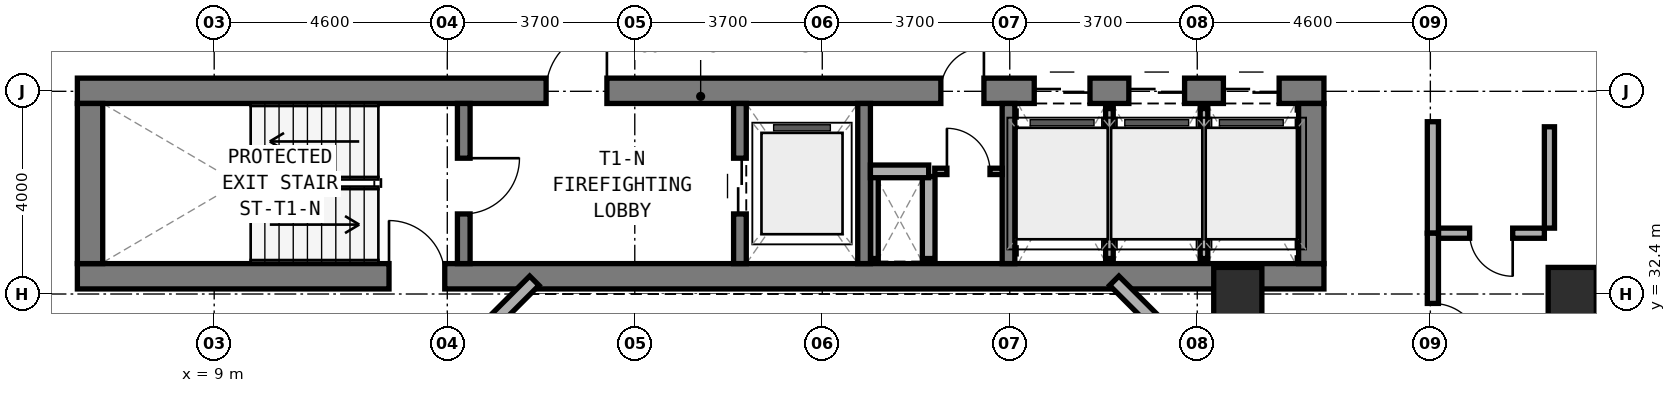
"""IFC4 building model, lengths in metres.
Left out: names, types, materials, properties, quantities, classifications, styles, units other than length and angle.
Written with IfcOpenShell. Run it as: python <this file> out.ifc"""

import sys

from ifc_helpers import new_model, si_unit, direction, frame, frame_2d, origin, origin_2d, place, context, subcontext, project, spatial, rectangle, extrude, element, fill, save


model = new_model("IFC4")
c1 = context("Model", 3, precision=1e-05, world=origin(), true_north=direction((0.0, 1.0)))
c2 = subcontext(c1, "Body", "Model", "MODEL_VIEW")
j1 = project(units=[si_unit("LENGTHUNIT", "METRE"), si_unit("PLANEANGLEUNIT", "RADIAN")], contexts=[c1])
p1 = place(None, origin())
s1 = spatial("IfcSite", under=j1, at=p1, CompositionType="ELEMENT")
p2 = place(p1, origin())
s2 = spatial("IfcBuilding", under=s1, at=p2, CompositionType="ELEMENT")
p3 = place(p2, frame((0.0, 0.0, 59.0)))
s3 = spatial("IfcBuildingStorey", under=s2, at=p3, CompositionType="ELEMENT", Elevation=59.0)
p4 = place(p3, frame((6.3, 32.75, 0.0), z_axis=(0.0, 0.0, 1.0), x_axis=(1.0, 0.0, 0.0)))
e1 = element("IfcWall", 1, at=p4, inside=s3, PredefinedType="SHEAR", context=c2, shape_type="SweptSolid", body=[
    extrude(rectangle(XDim=24.6, YDim=0.5, at=frame_2d((12.3, 0.0))), origin(), (0.0, 0.0, 1.0), 3.5),
])
p5 = place(p4, frame((6.15, 0.0, 0.0)))
e2 = element("IfcOpeningElement", 2, at=p5, cuts=e1, PredefinedType="OPENING", context=c2, shape_type="SweptSolid", body=[
    extrude(rectangle(XDim=1.1, YDim=2.15, at=frame_2d((0.55, 1.075))), frame((0.0, 0.26, 0.0), z_axis=(0.0, -1.0, 0.0), x_axis=(1.0, 0.0, 0.0)), (0.0, 0.0, 1.0), 0.52),
])
p6 = place(p3, frame((6.3, 36.41, 0.0), z_axis=(0.0, 0.0, 1.0), x_axis=(1.0, 0.0, 0.0)))
e3 = element("IfcWall", 3, at=p6, inside=s3, PredefinedType="SHEAR", context=c2, shape_type="SweptSolid", body=[
    extrude(rectangle(XDim=24.6, YDim=0.5, at=frame_2d((12.3, 0.0))), origin(), (0.0, 0.0, 1.0), 3.5),
])
p7 = place(p6, frame((9.25, 0.0, 0.0)))
e4 = element("IfcOpeningElement", 4, at=p7, cuts=e3, PredefinedType="OPENING", context=c2, shape_type="SweptSolid", body=[
    extrude(rectangle(XDim=1.2, YDim=2.15, at=frame_2d((0.6, 1.075))), frame((0.0, 0.26, 0.0), z_axis=(0.0, -1.0, 0.0), x_axis=(1.0, 0.0, 0.0)), (0.0, 0.0, 1.0), 0.52),
])
p8 = place(p6, frame((17.04, 0.0, 0.0)))
e5 = element("IfcOpeningElement", 5, at=p8, cuts=e3, PredefinedType="OPENING", context=c2, shape_type="SweptSolid", body=[
    extrude(rectangle(XDim=0.85, YDim=2.1, at=frame_2d((0.425, 1.05))), frame((0.0, 0.26, 0.0), z_axis=(0.0, -1.0, 0.0), x_axis=(1.0, 0.0, 0.0)), (0.0, 0.0, 1.0), 0.52),
])
p9 = place(p6, frame((18.883, 0.0, 0.0)))
e6 = element("IfcOpeningElement", 6, at=p9, cuts=e3, PredefinedType="OPENING", context=c2, shape_type="SweptSolid", body=[
    extrude(rectangle(XDim=1.1, YDim=2.15, at=frame_2d((0.55, 1.075))), frame((0.0, 0.26, 0.0), z_axis=(0.0, -1.0, 0.0), x_axis=(1.0, 0.0, 0.0)), (0.0, 0.0, 1.0), 0.52),
])
p10 = place(p6, frame((20.75, 0.0, 0.0)))
e7 = element("IfcOpeningElement", 7, at=p10, cuts=e3, PredefinedType="OPENING", context=c2, shape_type="SweptSolid", body=[
    extrude(rectangle(XDim=1.1, YDim=2.15, at=frame_2d((0.55, 1.075))), frame((0.0, 0.26, 0.0), z_axis=(0.0, -1.0, 0.0), x_axis=(1.0, 0.0, 0.0)), (0.0, 0.0, 1.0), 0.52),
])
p11 = place(p6, frame((22.616, 0.0, 0.0)))
e8 = element("IfcOpeningElement", 8, at=p11, cuts=e3, PredefinedType="OPENING", context=c2, shape_type="SweptSolid", body=[
    extrude(rectangle(XDim=1.1, YDim=2.15, at=frame_2d((0.55, 1.075))), frame((0.0, 0.26, 0.0), z_axis=(0.0, -1.0, 0.0), x_axis=(1.0, 0.0, 0.0)), (0.0, 0.0, 1.0), 0.52),
])
for number, where, z_axis, x_axis in (
    (9, (6.55, 33.0, 0.0), (0.0, 0.0, 1.0), (0.0, 1.0, 0.0)),
    (10, (30.65, 33.0, 0.0), (0.0, 0.0, 1.0), (0.0, 1.0, 0.0)),
):
    element("IfcWall", number, at=place(p3, frame(where, z_axis=z_axis, x_axis=x_axis)), inside=s3, PredefinedType="SHEAR", context=c2, shape_type="SweptSolid", body=[
        extrude(rectangle(XDim=3.16, YDim=0.5, at=frame_2d((1.58, 0.0))), origin(), (0.0, 0.0, 1.0), 3.5),
    ])
p12 = place(p3, frame((13.925, 33.0, 0.0), z_axis=(0.0, 0.0, 1.0), x_axis=(0.0, 1.0, 0.0)))
e11 = element("IfcWall", 11, at=p12, inside=s3, PredefinedType="STANDARD", context=c2, shape_type="SweptSolid", body=[
    extrude(rectangle(XDim=3.16, YDim=0.25, at=frame_2d((1.58, 0.0))), origin(), (0.0, 0.0, 1.0), 3.22),
])
p13 = place(p12, frame((0.98, 0.0, 0.0)))
e12 = element("IfcOpeningElement", 12, at=p13, cuts=e11, PredefinedType="OPENING", context=c2, shape_type="SweptSolid", body=[
    extrude(rectangle(XDim=1.1, YDim=2.15, at=frame_2d((0.55, 1.075))), frame((0.0, 0.135, 0.0), z_axis=(0.0, -1.0, 0.0), x_axis=(1.0, 0.0, 0.0)), (0.0, 0.0, 1.0), 0.27),
])
p14 = place(p3, frame((19.375, 33.0, 0.0), z_axis=(0.0, 0.0, 1.0), x_axis=(0.0, 1.0, 0.0)))
e13 = element("IfcWall", 13, at=p14, inside=s3, PredefinedType="STANDARD", context=c2, shape_type="SweptSolid", body=[
    extrude(rectangle(XDim=3.16, YDim=0.25, at=frame_2d((1.58, 0.0))), origin(), (0.0, 0.0, 1.0), 3.22),
])
p15 = place(p14, frame((0.98, 0.0, 0.0)))
e14 = element("IfcOpeningElement", 14, at=p15, cuts=e13, PredefinedType="OPENING", context=c2, shape_type="SweptSolid", body=[
    extrude(rectangle(XDim=1.1, YDim=2.15, at=frame_2d((0.55, 1.075))), frame((0.0, 0.135, 0.0), z_axis=(0.0, -1.0, 0.0), x_axis=(1.0, 0.0, 0.0)), (0.0, 0.0, 1.0), 0.27),
])
for number, where, z_axis, x_axis in (
    (15, (21.825, 33.0, 0.0), (0.0, 0.0, 1.0), (0.0, 1.0, 0.0)),
    (16, (24.675, 33.0, 0.0), (0.0, 0.0, 1.0), (0.0, 1.0, 0.0)),
):
    element("IfcWall", number, at=place(p3, frame(where, z_axis=z_axis, x_axis=x_axis)), inside=s3, PredefinedType="STANDARD", context=c2, shape_type="SweptSolid", body=[
        extrude(rectangle(XDim=3.16, YDim=0.25, at=frame_2d((1.58, 0.0))), origin(), (0.0, 0.0, 1.0), 3.22),
    ])
for number, where, z_axis, x_axis in (
    (17, (35.8, 32.35, 0.0), (0.0, 0.0, 1.0), (1.0, 0.0, 0.0)),
    (18, (29.2, 32.35, 0.0), (0.0, 0.0, 1.0), (1.0, 0.0, 0.0)),
):
    element("IfcColumn", number, at=place(p3, frame(where, z_axis=z_axis, x_axis=x_axis)), inside=s3, PredefinedType="COLUMN", context=c2, shape_type="SweptSolid", body=[
        extrude(rectangle(XDim=0.95, YDim=1.15, at=origin_2d()), origin(), (0.0, 0.0, 1.0), 3.5),
    ])
p16 = place(p3, frame((28.596, 30.828, 0.0), z_axis=(0.0, 0.0, 1.0), x_axis=(-0.707059717605, 0.707153841636, 0.0)))
e19 = element("IfcWall", 19, at=p16, inside=s3, PredefinedType="STANDARD", context=c2, shape_type="SweptSolid", body=[
    extrude(rectangle(XDim=2.594, YDim=0.26, at=frame_2d((1.297, 0.0))), origin(), (0.0, 0.0, 1.0), 3.22),
])
p17 = place(p3, frame((15.318, 32.662, 0.0), z_axis=(0.0, 0.0, 1.0), x_axis=(-0.707106781187, -0.707106781187, 0.0)))
e20 = element("IfcWall", 20, at=p17, inside=s3, PredefinedType="STANDARD", context=c2, shape_type="SweptSolid", body=[
    extrude(rectangle(XDim=2.594, YDim=0.26, at=frame_2d((1.297, 0.0))), origin(), (0.0, 0.0, 1.0), 3.22),
])
p18 = place(p3, frame((22.03, 33.1, 0.0), z_axis=(0.0, 0.0, 1.0), x_axis=(0.0, 1.0, 0.0)))
e21 = element("IfcWall", 21, at=p18, inside=s3, PredefinedType="PARTITIONING", context=c2, shape_type="SweptSolid", body=[
    extrude(rectangle(XDim=1.62, YDim=0.15, at=frame_2d((0.81, 0.0))), origin(), (0.0, 0.0, 1.0), 3.22),
])
p19 = place(p3, frame((23.1, 33.1, 0.0), z_axis=(0.0, 0.0, 1.0), x_axis=(0.0, 1.0, 0.0)))
e22 = element("IfcWall", 22, at=p19, inside=s3, PredefinedType="SOLIDWALL", context=c2, shape_type="SweptSolid", body=[
    extrude(rectangle(XDim=1.62, YDim=0.25, at=frame_2d((0.81, 0.0))), origin(), (0.0, 0.0, 1.0), 3.22),
])
p20 = place(p3, frame((21.95, 34.82, 0.0), z_axis=(0.0, 0.0, 1.0), x_axis=(1.0, 0.0, 0.0)))
e23 = element("IfcWall", 23, at=p20, inside=s3, PredefinedType="SOLIDWALL", context=c2, shape_type="SweptSolid", body=[
    extrude(rectangle(XDim=1.15, YDim=0.25, at=frame_2d((0.575, 0.0))), origin(), (0.0, 0.0, 1.0), 3.22),
])
p21 = place(p3, frame((23.22, 34.82, 0.0), z_axis=(0.0, 0.0, 1.0), x_axis=(1.0, 0.0, 0.0)))
e24 = element("IfcWall", 24, at=p21, inside=s3, PredefinedType="PARTITIONING", context=c2, shape_type="SweptSolid", body=[
    extrude(rectangle(XDim=1.33, YDim=0.125, at=frame_2d((0.665, 0.0))), origin(), (0.0, 0.0, 1.0), 3.22),
])
p22 = place(p21, frame((0.24, 0.0, 0.0)))
e25 = element("IfcOpeningElement", 25, at=p22, cuts=e24, PredefinedType="OPENING", context=c2, shape_type="SweptSolid", body=[
    extrude(rectangle(XDim=0.85, YDim=2.1, at=frame_2d((0.425, 1.05))), frame((0.0, 0.073, 0.0), z_axis=(0.0, -1.0, 0.0), x_axis=(1.0, 0.0, 0.0)), (0.0, 0.0, 1.0), 0.145),
])
p23 = place(p3, frame((26.667, 33.1, 0.0), z_axis=(0.0, 0.0, 1.0), x_axis=(0.0, 1.0, 0.0)))
e26 = element("IfcWall", 26, at=p23, inside=s3, PredefinedType="PARTITIONING", context=c2, shape_type="SweptSolid", body=[
    extrude(rectangle(XDim=2.96, YDim=0.15, at=frame_2d((1.48, 0.0))), origin(), (0.0, 0.0, 1.0), 3.22),
])
p24 = place(p3, frame((28.533, 33.1, 0.0), z_axis=(0.0, 0.0, 1.0), x_axis=(0.0, 1.0, 0.0)))
e27 = element("IfcWall", 27, at=p24, inside=s3, PredefinedType="PARTITIONING", context=c2, shape_type="SweptSolid", body=[
    extrude(rectangle(XDim=2.96, YDim=0.15, at=frame_2d((1.48, 0.0))), origin(), (0.0, 0.0, 1.0), 2.495),
])
p25 = place(p3, frame((33.15, 33.6, 0.0), z_axis=(0.0, 0.0, 1.0), x_axis=(1.0, 0.0, 0.0)))
e28 = element("IfcWall", 28, at=p25, inside=s3, PredefinedType="PLUMBINGWALL", context=c2, shape_type="SweptSolid", body=[
    extrude(rectangle(XDim=2.1, YDim=0.2, at=frame_2d((1.05, 0.0))), origin(), (0.0, 0.0, 1.0), 3.22),
])
p26 = place(p25, frame((0.625, 0.0, 0.0)))
e29 = element("IfcOpeningElement", 29, at=p26, cuts=e28, PredefinedType="OPENING", context=c2, shape_type="SweptSolid", body=[
    extrude(rectangle(XDim=0.85, YDim=2.1, at=frame_2d((0.425, 1.05))), frame((0.0, 0.11, 0.0), z_axis=(0.0, -1.0, 0.0), x_axis=(1.0, 0.0, 0.0)), (0.0, 0.0, 1.0), 0.22),
])
p27 = place(p3, frame((35.35, 33.7, 0.0), z_axis=(0.0, 0.0, 1.0), x_axis=(0.0, 1.0, 0.0)))
e30 = element("IfcWall", 30, at=p27, inside=s3, PredefinedType="PLUMBINGWALL", context=c2, shape_type="SweptSolid", body=[
    extrude(rectangle(XDim=2.0, YDim=0.2, at=frame_2d((1.0, 0.0))), origin(), (0.0, 0.0, 1.0), 2.745),
])
p28 = place(p3, frame((33.05, 33.6, 0.0), z_axis=(0.0, 0.0, 1.0), x_axis=(0.0, 1.0, 0.0)))
e31 = element("IfcWall", 31, at=p28, inside=s3, PredefinedType="SOLIDWALL", context=c2, shape_type="SweptSolid", body=[
    extrude(rectangle(XDim=2.2, YDim=0.22, at=frame_2d((1.1, 0.0))), origin(), (0.0, 0.0, 1.0), 3.22),
])
p29 = place(p3, frame((33.05, 29.878, 0.0), z_axis=(0.0, 0.0, 1.0), x_axis=(0.0, 1.0, 0.0)))
e32 = element("IfcWall", 32, at=p29, inside=s3, PredefinedType="SOLIDWALL", context=c2, shape_type="SweptSolid", body=[
    extrude(rectangle(XDim=3.722, YDim=0.22, at=frame_2d((1.861, 0.0))), origin(), (0.0, 0.0, 1.0), 2.495),
])
p30 = place(p29, frame((1.386, 0.0, 0.0)))
e33 = element("IfcOpeningElement", 33, at=p30, cuts=e32, PredefinedType="OPENING", context=c2, shape_type="SweptSolid", body=[
    extrude(rectangle(XDim=0.95, YDim=2.1, at=frame_2d((0.475, 1.05))), frame((0.0, 0.12, 0.0), z_axis=(0.0, -1.0, 0.0), x_axis=(1.0, 0.0, 0.0)), (0.0, 0.0, 1.0), 0.24),
])
p31 = place(p13, frame((1.1, 0.0, 0.0), z_axis=(0.0, 0.0, 1.0), x_axis=(-1.0, 0.0, 0.0)))
e34 = element("IfcDoor", 34, at=p31, inside=s3, OperationType="SINGLE_SWING_LEFT", PredefinedType="DOOR", context=c2, shape_type="SweptSolid", body=[
    extrude(rectangle(XDim=1.1, YDim=2.15, at=frame_2d((0.55, 1.075))), frame((0.0, 0.025, 0.0), z_axis=(0.0, -1.0, 0.0), x_axis=(1.0, 0.0, 0.0)), (0.0, 0.0, 1.0), 0.05),
])
fill(e12, e34)
p32 = place(p7, origin())
e35 = element("IfcDoor", 35, at=p32, inside=s3, OperationType="SINGLE_SWING_RIGHT", PredefinedType="DOOR", context=c2, shape_type="SweptSolid", body=[
    extrude(rectangle(XDim=1.2, YDim=2.15, at=frame_2d((0.6, 1.075))), frame((0.0, 0.025, 0.0), z_axis=(0.0, -1.0, 0.0), x_axis=(1.0, 0.0, 0.0)), (0.0, 0.0, 1.0), 0.05),
])
fill(e4, e35)
p33 = place(p15, origin())
e36 = element("IfcDoor", 36, at=p33, inside=s3, OperationType="DOUBLE_DOOR_SLIDING", PredefinedType="DOOR", context=c2, shape_type="SweptSolid", body=[
    extrude(rectangle(XDim=1.1, YDim=2.15, at=frame_2d((0.55, 1.075))), frame((0.0, 0.025, 0.0), z_axis=(0.0, -1.0, 0.0), x_axis=(1.0, 0.0, 0.0)), (0.0, 0.0, 1.0), 0.05),
])
fill(e14, e36)
p34 = place(p8, origin())
e37 = element("IfcDoor", 37, at=p34, inside=s3, OperationType="SINGLE_SWING_RIGHT", PredefinedType="DOOR", context=c2, shape_type="SweptSolid", body=[
    extrude(rectangle(XDim=0.85, YDim=2.1, at=frame_2d((0.425, 1.05))), frame((0.0, 0.025, 0.0), z_axis=(0.0, -1.0, 0.0), x_axis=(1.0, 0.0, 0.0)), (0.0, 0.0, 1.0), 0.05),
])
fill(e5, e37)
p35 = place(p9, origin())
e38 = element("IfcDoor", 38, at=p35, inside=s3, OperationType="DOUBLE_DOOR_SLIDING", PredefinedType="DOOR", context=c2, shape_type="SweptSolid", body=[
    extrude(rectangle(XDim=1.1, YDim=2.15, at=frame_2d((0.55, 1.075))), frame((0.0, 0.025, 0.0), z_axis=(0.0, -1.0, 0.0), x_axis=(1.0, 0.0, 0.0)), (0.0, 0.0, 1.0), 0.05),
])
fill(e6, e38)
p36 = place(p10, origin())
e39 = element("IfcDoor", 39, at=p36, inside=s3, OperationType="DOUBLE_DOOR_SLIDING", PredefinedType="DOOR", context=c2, shape_type="SweptSolid", body=[
    extrude(rectangle(XDim=1.1, YDim=2.15, at=frame_2d((0.55, 1.075))), frame((0.0, 0.025, 0.0), z_axis=(0.0, -1.0, 0.0), x_axis=(1.0, 0.0, 0.0)), (0.0, 0.0, 1.0), 0.05),
])
fill(e7, e39)
p37 = place(p11, origin())
e40 = element("IfcDoor", 40, at=p37, inside=s3, OperationType="DOUBLE_DOOR_SLIDING", PredefinedType="DOOR", context=c2, shape_type="SweptSolid", body=[
    extrude(rectangle(XDim=1.1, YDim=2.15, at=frame_2d((0.55, 1.075))), frame((0.0, 0.025, 0.0), z_axis=(0.0, -1.0, 0.0), x_axis=(1.0, 0.0, 0.0)), (0.0, 0.0, 1.0), 0.05),
])
fill(e8, e40)
p38 = place(p5, origin())
e41 = element("IfcDoor", 41, at=p38, inside=s3, OperationType="SINGLE_SWING_LEFT", PredefinedType="DOOR", context=c2, shape_type="SweptSolid", body=[
    extrude(rectangle(XDim=1.1, YDim=2.15, at=frame_2d((0.55, 1.075))), frame((0.0, 0.025, 0.0), z_axis=(0.0, -1.0, 0.0), x_axis=(1.0, 0.0, 0.0)), (0.0, 0.0, 1.0), 0.05),
])
fill(e2, e41)
p39 = place(p22, origin())
e42 = element("IfcDoor", 42, at=p39, inside=s3, OperationType="SINGLE_SWING_LEFT", PredefinedType="DOOR", context=c2, shape_type="SweptSolid", body=[
    extrude(rectangle(XDim=0.85, YDim=2.1, at=frame_2d((0.425, 1.05))), frame((0.0, 0.025, 0.0), z_axis=(0.0, -1.0, 0.0), x_axis=(1.0, 0.0, 0.0)), (0.0, 0.0, 1.0), 0.05),
])
fill(e25, e42)
p40 = place(p26, frame((0.85, 0.0, 0.0), z_axis=(0.0, 0.0, 1.0), x_axis=(-1.0, 0.0, 0.0)))
e43 = element("IfcDoor", 43, at=p40, inside=s3, OperationType="SINGLE_SWING_LEFT", PredefinedType="DOOR", context=c2, shape_type="SweptSolid", body=[
    extrude(rectangle(XDim=0.85, YDim=2.1, at=frame_2d((0.425, 1.05))), frame((0.0, 0.025, 0.0), z_axis=(0.0, -1.0, 0.0), x_axis=(1.0, 0.0, 0.0)), (0.0, 0.0, 1.0), 0.05),
])
fill(e29, e43)
p41 = place(p30, frame((0.95, 0.0, 0.0), z_axis=(0.0, 0.0, 1.0), x_axis=(-1.0, 0.0, 0.0)))
e44 = element("IfcDoor", 44, at=p41, inside=s3, OperationType="SINGLE_SWING_RIGHT", PredefinedType="DOOR", context=c2, shape_type="SweptSolid", body=[
    extrude(rectangle(XDim=0.95, YDim=2.1, at=frame_2d((0.475, 1.05))), frame((0.0, 0.025, 0.0), z_axis=(0.0, -1.0, 0.0), x_axis=(1.0, 0.0, 0.0)), (0.0, 0.0, 1.0), 0.05),
])
fill(e33, e44)
save(model, sys.argv[1])
